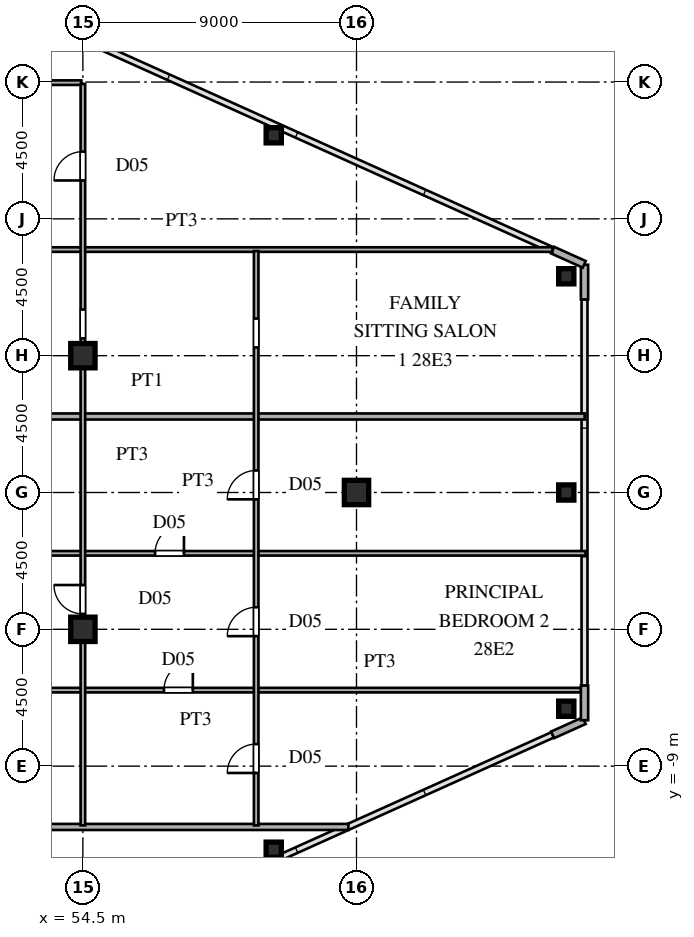
"""IFC4 building model, lengths in metres.
Left out: names, types, materials, properties, quantities, classifications, styles, units other than length and angle.
Written with IfcOpenShell. Run it as: python <this file> out.ifc"""

import sys

from ifc_helpers import new_model, si_unit, direction, frame, frame_2d, origin, origin_2d, place, context, subcontext, project, spatial, rectangle, hollow_rectangle, i_section, extrude, source, transform, mapped, element, fill, save


model = new_model("IFC4")
c1 = context("Model", 3, precision=1e-05, world=origin(), true_north=direction((0.0, 1.0)))
c2 = subcontext(c1, "Body", "Model", "MODEL_VIEW")
j1 = project(units=[si_unit("LENGTHUNIT", "METRE"), si_unit("PLANEANGLEUNIT", "RADIAN")], contexts=[c1])
p1 = place(None, origin())
s1 = spatial("IfcSite", under=j1, at=p1, CompositionType="ELEMENT")
p2 = place(p1, origin())
s2 = spatial("IfcBuilding", under=s1, at=p2, CompositionType="ELEMENT")
p3 = place(p2, frame((0.0, 0.0, 106.8)))
s3 = spatial("IfcBuildingStorey", under=s2, at=p3, CompositionType="ELEMENT", Elevation=106.8)
m1 = source(origin(), c2, "Body", "SweptSolid", [
    extrude(i_section(OverallWidth=0.8, OverallDepth=0.8, WebThickness=0.032, FlangeThickness=0.05, at=origin_2d()), origin(), (0.0, 0.0, 1.0), 3.6),
])
for number, where, z_axis, x_axis in (
    (1, (54.5, -4.5, 0.0), (0.0, 0.0, 1.0), (1.0, 0.0, 0.0)),
    (2, (54.5, 4.5, 0.0), (0.0, 0.0, 1.0), (1.0, 0.0, 0.0)),
    (3, (63.5, 0.0, 0.0), (0.0, 0.0, 1.0), (1.0, 0.0, 0.0)),
):
    element("IfcColumn", number, at=place(p3, frame(where, z_axis=z_axis, x_axis=x_axis)), inside=s3, PredefinedType="COLUMN", context=c2, shape_type="MappedRepresentation", body=[
        mapped(m1, transform((0.0, 0.0, 0.0), scale=1.0)),
    ])
m2 = source(origin(), c2, "Body", "SweptSolid", [
    extrude(hollow_rectangle(XDim=0.5, YDim=0.5, WallThickness=0.02, at=origin_2d()), origin(), (0.0, 0.0, 1.0), 3.6),
])
for number, where, z_axis, x_axis in (
    (4, (70.4, -7.112, 0.0), (0.0, 0.0, 1.0), (1.0, 0.0, 0.0)),
    (5, (70.4, 7.112, 0.0), (0.0, 0.0, 1.0), (1.0, 0.0, 0.0)),
    (6, (60.778, -11.749, 0.0), (0.0, 0.0, 1.0), (1.0, 0.0, 0.0)),
    (7, (60.778, 11.749, 0.0), (0.0, 0.0, 1.0), (1.0, 0.0, 0.0)),
    (8, (70.4, 0.0, 0.0), (0.0, 0.0, 1.0), (1.0, 0.0, 0.0)),
):
    element("IfcColumn", number, at=place(p3, frame(where, z_axis=z_axis, x_axis=x_axis)), inside=s3, PredefinedType="COLUMN", context=c2, shape_type="MappedRepresentation", body=[
        mapped(m2, transform((0.0, 0.0, 0.0), scale=1.0)),
    ])
for number, where, z_axis, x_axis in (
    (9, (69.951, -7.972, 0.0), (0.0, 0.0, 1.0), (0.912, 0.41, 0.0)),
    (10, (71.0, -7.49, 0.0), (0.0, 0.0, 1.0), (0.0, 1.0, 0.0)),
    (11, (71.0, 6.35, 0.0), (0.0, 0.0, 1.0), (0.0, 1.0, 0.0)),
    (12, (70.991, 7.504, 0.0), (0.0, 0.0, 1.0), (-0.912, 0.41, 0.0)),
):
    element("IfcWall", number, at=place(p3, frame(where, z_axis=z_axis, x_axis=x_axis)), inside=s3, PredefinedType="SOLIDWALL", context=c2, shape_type="SweptSolid", body=[
        extrude(rectangle(XDim=1.14, YDim=0.24, at=frame_2d((0.57, 0.0))), origin(), (0.0, 0.0, 1.0), 3.38),
    ])
p4 = place(p3, frame((39.93, -11.0, 0.0), z_axis=(0.0, 0.0, 1.0), x_axis=(1.0, 0.0, 0.0)))
e13 = element("IfcWall", 13, at=p4, inside=s3, PredefinedType="PARTITIONING", context=c2, shape_type="SweptSolid", body=[
    extrude(rectangle(XDim=23.304, YDim=0.2, at=frame_2d((11.652, 0.0))), origin(), (0.0, 0.0, 1.0), 3.38),
])
p5 = place(p3, frame((45.55, -6.5, 0.0), z_axis=(0.0, 0.0, 1.0), x_axis=(1.0, 0.0, 0.0)))
e14 = element("IfcWall", 14, at=p5, inside=s3, PredefinedType="PARTITIONING", context=c2, shape_type="SweptSolid", body=[
    extrude(rectangle(XDim=25.325, YDim=0.15, at=frame_2d((12.663, 0.0))), origin(), (0.0, 0.0, 1.0), 3.38),
])
p6 = place(p5, frame((3.975, 0.0, 0.0)))
e15 = element("IfcOpeningElement", 15, at=p6, cuts=e14, PredefinedType="OPENING", context=c2, shape_type="SweptSolid", body=[
    extrude(rectangle(XDim=0.95, YDim=2.15, at=frame_2d((0.475, 1.075))), frame((0.0, 0.085, 0.0), z_axis=(0.0, -1.0, 0.0), x_axis=(1.0, 0.0, 0.0)), (0.0, 0.0, 1.0), 0.17),
])
p7 = place(p5, frame((11.617, 0.0, 0.0)))
e16 = element("IfcOpeningElement", 16, at=p7, cuts=e14, PredefinedType="OPENING", context=c2, shape_type="SweptSolid", body=[
    extrude(rectangle(XDim=0.95, YDim=2.15, at=frame_2d((0.475, 1.075))), frame((0.0, 0.085, 0.0), z_axis=(0.0, -1.0, 0.0), x_axis=(1.0, 0.0, 0.0)), (0.0, 0.0, 1.0), 0.17),
])
p8 = place(p3, frame((45.55, -2.0, 0.0), z_axis=(0.0, 0.0, 1.0), x_axis=(1.0, 0.0, 0.0)))
e17 = element("IfcWall", 17, at=p8, inside=s3, PredefinedType="PARTITIONING", context=c2, shape_type="SweptSolid", body=[
    extrude(rectangle(XDim=25.485, YDim=0.15, at=frame_2d((12.742, 0.0))), origin(), (0.0, 0.0, 1.0), 3.38),
])
p9 = place(p8, frame((3.975, 0.0, 0.0)))
e18 = element("IfcOpeningElement", 18, at=p9, cuts=e17, PredefinedType="OPENING", context=c2, shape_type="SweptSolid", body=[
    extrude(rectangle(XDim=0.95, YDim=2.15, at=frame_2d((0.475, 1.075))), frame((0.0, 0.085, 0.0), z_axis=(0.0, -1.0, 0.0), x_axis=(1.0, 0.0, 0.0)), (0.0, 0.0, 1.0), 0.17),
])
p10 = place(p8, frame((11.325, 0.0, 0.0)))
e19 = element("IfcOpeningElement", 19, at=p10, cuts=e17, PredefinedType="OPENING", context=c2, shape_type="SweptSolid", body=[
    extrude(rectangle(XDim=0.95, YDim=2.15, at=frame_2d((0.475, 1.075))), frame((0.0, 0.085, 0.0), z_axis=(0.0, -1.0, 0.0), x_axis=(1.0, 0.0, 0.0)), (0.0, 0.0, 1.0), 0.17),
])
p11 = place(p3, frame((39.93, 2.5, 0.0), z_axis=(0.0, 0.0, 1.0), x_axis=(1.0, 0.0, 0.0)))
e20 = element("IfcWall", 20, at=p11, inside=s3, PredefinedType="PARTITIONING", context=c2, shape_type="SweptSolid", body=[
    extrude(rectangle(XDim=31.075, YDim=0.2, at=frame_2d((15.538, 0.0))), origin(), (0.0, 0.0, 1.0), 3.38),
])
p12 = place(p3, frame((45.55, 7.99, 0.0), z_axis=(0.0, 0.0, 1.0), x_axis=(1.0, 0.0, 0.0)))
e21 = element("IfcWall", 21, at=p12, inside=s3, PredefinedType="PARTITIONING", context=c2, shape_type="SweptSolid", body=[
    extrude(rectangle(XDim=24.392, YDim=0.15, at=frame_2d((12.196, 0.0))), origin(), (0.0, 0.0, 1.0), 3.38),
])
p13 = place(p12, frame((3.975, 0.0, 0.0)))
e22 = element("IfcOpeningElement", 22, at=p13, cuts=e21, PredefinedType="OPENING", context=c2, shape_type="SweptSolid", body=[
    extrude(rectangle(XDim=0.95, YDim=2.15, at=frame_2d((0.475, 1.075))), frame((0.0, 0.085, 0.0), z_axis=(0.0, -1.0, 0.0), x_axis=(1.0, 0.0, 0.0)), (0.0, 0.0, 1.0), 0.17),
])
p14 = place(p3, frame((46.974, 13.48, 0.0), z_axis=(0.0, 0.0, 1.0), x_axis=(1.0, 0.0, 0.0)))
e23 = element("IfcWall", 23, at=p14, inside=s3, PredefinedType="PARTITIONING", context=c2, shape_type="SweptSolid", body=[
    extrude(rectangle(XDim=7.476, YDim=0.15, at=frame_2d((3.738, 0.0))), origin(), (0.0, 0.0, 1.0), 3.38),
])
p15 = place(p14, frame((2.551, 0.0, 0.0)))
e24 = element("IfcOpeningElement", 24, at=p15, cuts=e23, PredefinedType="OPENING", context=c2, shape_type="SweptSolid", body=[
    extrude(rectangle(XDim=0.95, YDim=2.15, at=frame_2d((0.475, 1.075))), frame((0.0, 0.085, 0.0), z_axis=(0.0, -1.0, 0.0), x_axis=(1.0, 0.0, 0.0)), (0.0, 0.0, 1.0), 0.17),
])
p16 = place(p3, frame((54.5, -10.95, 0.0), z_axis=(0.0, 0.0, 1.0), x_axis=(0.0, 1.0, 0.0)))
e25 = element("IfcWall", 25, at=p16, inside=s3, PredefinedType="PARTITIONING", context=c2, shape_type="SweptSolid", body=[
    extrude(rectangle(XDim=24.383, YDim=0.15, at=frame_2d((12.191, 0.0))), origin(), (0.0, 0.0, 1.0), 2.78),
])
p17 = place(p16, frame((6.957, 0.0, 0.0)))
e26 = element("IfcOpeningElement", 26, at=p17, cuts=e25, PredefinedType="OPENING", context=c2, shape_type="SweptSolid", body=[
    extrude(rectangle(XDim=0.95, YDim=2.15, at=frame_2d((0.475, 1.075))), frame((0.0, 0.085, 0.0), z_axis=(0.0, -1.0, 0.0), x_axis=(1.0, 0.0, 0.0)), (0.0, 0.0, 1.0), 0.17),
])
p18 = place(p16, frame((21.212, 0.0, 0.0)))
e27 = element("IfcOpeningElement", 27, at=p18, cuts=e25, PredefinedType="OPENING", context=c2, shape_type="SweptSolid", body=[
    extrude(rectangle(XDim=0.95, YDim=2.15, at=frame_2d((0.475, 1.075))), frame((0.0, 0.085, 0.0), z_axis=(0.0, -1.0, 0.0), x_axis=(1.0, 0.0, 0.0)), (0.0, 0.0, 1.0), 0.17),
])
p19 = place(p16, frame((16.018, 0.0, 0.0)))
e28 = element("IfcOpeningElement", 28, at=p19, cuts=e25, PredefinedType="OPENING", context=c2, shape_type="SweptSolid", body=[
    extrude(rectangle(XDim=0.95, YDim=2.15, at=frame_2d((0.475, 1.075))), frame((0.0, 0.085, 0.0), z_axis=(0.0, -1.0, 0.0), x_axis=(1.0, 0.0, 0.0)), (0.0, 0.0, 1.0), 0.17),
])
p20 = place(p3, frame((60.2, -10.95, 0.0), z_axis=(0.0, 0.0, 1.0), x_axis=(0.0, 1.0, 0.0)))
e29 = element("IfcWall", 29, at=p20, inside=s3, PredefinedType="PARTITIONING", context=c2, shape_type="SweptSolid", body=[
    extrude(rectangle(XDim=18.892, YDim=0.15, at=frame_2d((9.446, 0.0))), origin(), (0.0, 0.0, 1.0), 3.38),
])
p21 = place(p20, frame((1.725, 0.0, 0.0)))
e30 = element("IfcOpeningElement", 30, at=p21, cuts=e29, PredefinedType="OPENING", context=c2, shape_type="SweptSolid", body=[
    extrude(rectangle(XDim=0.95, YDim=2.15, at=frame_2d((0.475, 1.075))), frame((0.0, 0.085, 0.0), z_axis=(0.0, -1.0, 0.0), x_axis=(1.0, 0.0, 0.0)), (0.0, 0.0, 1.0), 0.17),
])
p22 = place(p20, frame((6.225, 0.0, 0.0)))
e31 = element("IfcOpeningElement", 31, at=p22, cuts=e29, PredefinedType="OPENING", context=c2, shape_type="SweptSolid", body=[
    extrude(rectangle(XDim=0.95, YDim=2.15, at=frame_2d((0.475, 1.075))), frame((0.0, 0.085, 0.0), z_axis=(0.0, -1.0, 0.0), x_axis=(1.0, 0.0, 0.0)), (0.0, 0.0, 1.0), 0.17),
])
p23 = place(p20, frame((10.725, 0.0, 0.0)))
e32 = element("IfcOpeningElement", 32, at=p23, cuts=e29, PredefinedType="OPENING", context=c2, shape_type="SweptSolid", body=[
    extrude(rectangle(XDim=0.95, YDim=2.15, at=frame_2d((0.475, 1.075))), frame((0.0, 0.085, 0.0), z_axis=(0.0, -1.0, 0.0), x_axis=(1.0, 0.0, 0.0)), (0.0, 0.0, 1.0), 0.17),
])
p24 = place(p20, frame((15.721, 0.0, 0.0)))
e33 = element("IfcOpeningElement", 33, at=p24, cuts=e29, PredefinedType="OPENING", context=c2, shape_type="SweptSolid", body=[
    extrude(rectangle(XDim=0.95, YDim=2.15, at=frame_2d((0.475, 1.075))), frame((0.0, 0.085, 0.0), z_axis=(0.0, -1.0, 0.0), x_axis=(1.0, 0.0, 0.0)), (0.0, 0.0, 1.0), 0.17),
])
m3 = source(origin(), c2, "Body", "SweptSolid", [
    extrude(rectangle(XDim=0.95, YDim=2.15, at=frame_2d((0.475, 1.075))), frame((0.0, 0.025, 0.0), z_axis=(0.0, -1.0, 0.0), x_axis=(1.0, 0.0, 0.0)), (0.0, 0.0, 1.0), 0.05),
])
p25 = place(p7, origin())
e34 = element("IfcDoor", 34, at=p25, inside=s3, OperationType="SINGLE_SWING_RIGHT", PredefinedType="DOOR", context=c2, shape_type="MappedRepresentation", body=[
    mapped(m3, transform((0.0, 0.0, 0.0), scale=1.0)),
])
fill(e16, e34)
p26 = place(p10, origin())
e35 = element("IfcDoor", 35, at=p26, inside=s3, OperationType="SINGLE_SWING_RIGHT", PredefinedType="DOOR", context=c2, shape_type="MappedRepresentation", body=[
    mapped(m3, transform((0.0, 0.0, 0.0), scale=1.0)),
])
fill(e19, e35)
p27 = place(p17, origin())
e36 = element("IfcDoor", 36, at=p27, inside=s3, OperationType="SINGLE_SWING_RIGHT", PredefinedType="DOOR", context=c2, shape_type="MappedRepresentation", body=[
    mapped(m3, transform((0.0, 0.0, 0.0), scale=1.0)),
])
fill(e26, e36)
p28 = place(p18, origin())
e37 = element("IfcDoor", 37, at=p28, inside=s3, OperationType="SINGLE_SWING_LEFT", PredefinedType="DOOR", context=c2, shape_type="MappedRepresentation", body=[
    mapped(m3, transform((0.0, 0.0, 0.0), scale=1.0)),
])
fill(e27, e37)
p29 = place(p21, origin())
e38 = element("IfcDoor", 38, at=p29, inside=s3, OperationType="SINGLE_SWING_LEFT", PredefinedType="DOOR", context=c2, shape_type="MappedRepresentation", body=[
    mapped(m3, transform((0.0, 0.0, 0.0), scale=1.0)),
])
fill(e30, e38)
p30 = place(p22, origin())
e39 = element("IfcDoor", 39, at=p30, inside=s3, OperationType="SINGLE_SWING_LEFT", PredefinedType="DOOR", context=c2, shape_type="MappedRepresentation", body=[
    mapped(m3, transform((0.0, 0.0, 0.0), scale=1.0)),
])
fill(e31, e39)
p31 = place(p23, origin())
e40 = element("IfcDoor", 40, at=p31, inside=s3, OperationType="SINGLE_SWING_LEFT", PredefinedType="DOOR", context=c2, shape_type="MappedRepresentation", body=[
    mapped(m3, transform((0.0, 0.0, 0.0), scale=1.0)),
])
fill(e32, e40)
save(model, sys.argv[1])
